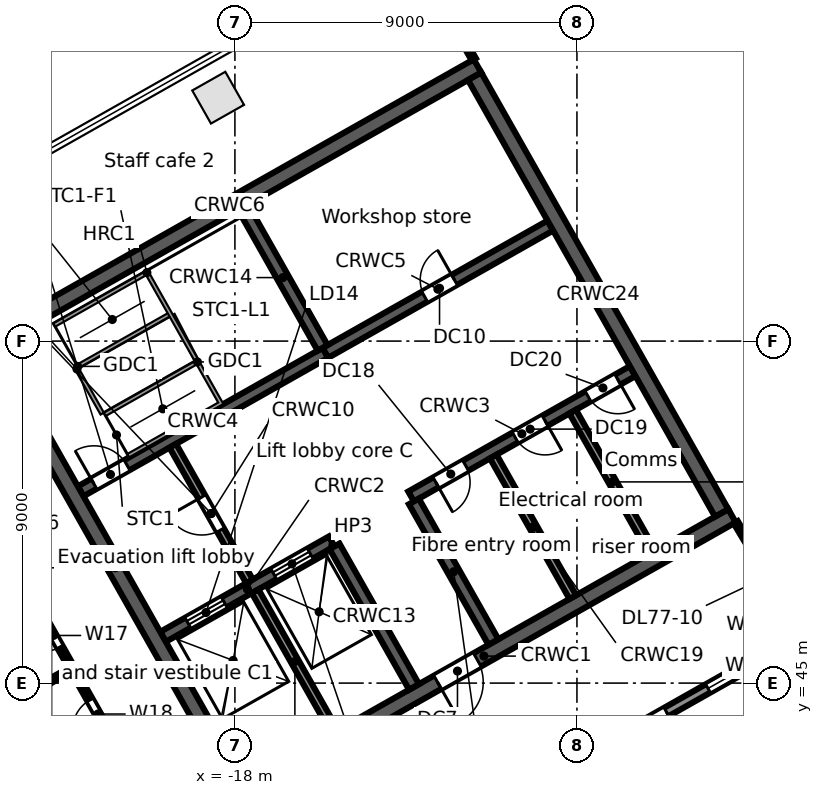
"""IFC4 building model, lengths in metres.
Left out: names, types, materials, properties, quantities, classifications, styles, units other than length and angle.
Written with IfcOpenShell. Run it as: python <this file> out.ifc"""

import sys

from ifc_helpers import new_model, si_unit, direction, frame, frame_2d, origin, origin_2d, place, context, subcontext, project, spatial, rectangle, extrude, element, fill, save


model = new_model("IFC4")
c1 = context("Model", 3, precision=1e-05, world=origin(), true_north=direction((0.0, 1.0)))
c2 = subcontext(c1, "Body", "Model", "MODEL_VIEW")
j1 = project(units=[si_unit("LENGTHUNIT", "METRE"), si_unit("PLANEANGLEUNIT", "RADIAN")], contexts=[c1])
p1 = place(None, origin())
s1 = spatial("IfcSite", under=j1, at=p1, CompositionType="ELEMENT")
p2 = place(p1, origin())
s2 = spatial("IfcBuilding", under=s1, at=p2, CompositionType="ELEMENT")
p3 = place(p2, frame((0.0, 0.0, 339.3)))
s3 = spatial("IfcBuildingStorey", under=s2, at=p3, CompositionType="ELEMENT", Elevation=339.3)
p4 = place(p3, frame((-18.441, 60.406, 0.0), z_axis=(0.0, 0.0, 1.0), x_axis=(-0.87035569594, -0.492423560103, 0.0)))
e1 = element("IfcColumn", 1, at=p4, inside=s3, PredefinedType="COLUMN", context=c2, shape_type="SweptSolid", body=[
    extrude(rectangle(XDim=1.0, YDim=1.0, at=origin_2d()), origin(), (0.0, 0.0, 1.0), 3.8),
])
p5 = place(p3, frame((-3.017, 46.293, 0.0), z_axis=(0.0, 0.0, 1.0), x_axis=(-0.870355474887, -0.492423950812, 0.0)))
e2 = element("IfcWall", 2, at=p5, inside=s3, PredefinedType="STANDARD", context=c2, shape_type="SweptSolid", body=[
    extrude(rectangle(XDim=40.34, YDim=0.25, at=frame_2d((20.17, 0.0))), origin(), (0.0, 0.0, 1.0), 3.52),
])
p6 = place(p5, frame((37.428, 0.0, 0.8)))
e3 = element("IfcOpeningElement", 3, at=p6, cuts=e2, PredefinedType="OPENING", context=c2, shape_type="SweptSolid", body=[
    extrude(rectangle(XDim=2.4, YDim=2.2, at=frame_2d((1.2, 1.1))), frame((0.0, 0.135, 0.0), z_axis=(0.0, -1.0, 0.0), x_axis=(1.0, 0.0, 0.0)), (0.0, 0.0, 1.0), 0.27),
])
p7 = place(p5, frame((34.372, 0.0, 0.0)))
e4 = element("IfcOpeningElement", 4, at=p7, cuts=e2, PredefinedType="OPENING", context=c2, shape_type="SweptSolid", body=[
    extrude(rectangle(XDim=1.8, YDim=2.4, at=frame_2d((0.9, 1.2))), frame((0.0, 0.135, 0.0), z_axis=(0.0, -1.0, 0.0), x_axis=(1.0, 0.0, 0.0)), (0.0, 0.0, 1.0), 0.27),
])
p8 = place(p5, frame((30.716, 0.0, 0.8)))
e5 = element("IfcOpeningElement", 5, at=p8, cuts=e2, PredefinedType="OPENING", context=c2, shape_type="SweptSolid", body=[
    extrude(rectangle(XDim=2.4, YDim=2.2, at=frame_2d((1.2, 1.1))), frame((0.0, 0.135, 0.0), z_axis=(0.0, -1.0, 0.0), x_axis=(1.0, 0.0, 0.0)), (0.0, 0.0, 1.0), 0.27),
])
p9 = place(p5, frame((27.36, 0.0, 0.8)))
e6 = element("IfcOpeningElement", 6, at=p9, cuts=e2, PredefinedType="OPENING", context=c2, shape_type="SweptSolid", body=[
    extrude(rectangle(XDim=2.4, YDim=2.2, at=frame_2d((1.2, 1.1))), frame((0.0, 0.135, 0.0), z_axis=(0.0, -1.0, 0.0), x_axis=(1.0, 0.0, 0.0)), (0.0, 0.0, 1.0), 0.27),
])
p10 = place(p5, frame((24.304, 0.0, 0.0)))
e7 = element("IfcOpeningElement", 7, at=p10, cuts=e2, PredefinedType="OPENING", context=c2, shape_type="SweptSolid", body=[
    extrude(rectangle(XDim=1.8, YDim=2.4, at=frame_2d((0.9, 1.2))), frame((0.0, 0.135, 0.0), z_axis=(0.0, -1.0, 0.0), x_axis=(1.0, 0.0, 0.0)), (0.0, 0.0, 1.0), 0.27),
])
p11 = place(p5, frame((20.648, 0.0, 0.8)))
e8 = element("IfcOpeningElement", 8, at=p11, cuts=e2, PredefinedType="OPENING", context=c2, shape_type="SweptSolid", body=[
    extrude(rectangle(XDim=2.4, YDim=2.2, at=frame_2d((1.2, 1.1))), frame((0.0, 0.135, 0.0), z_axis=(0.0, -1.0, 0.0), x_axis=(1.0, 0.0, 0.0)), (0.0, 0.0, 1.0), 0.27),
])
p12 = place(p5, frame((17.292, 0.0, 0.8)))
e9 = element("IfcOpeningElement", 9, at=p12, cuts=e2, PredefinedType="OPENING", context=c2, shape_type="SweptSolid", body=[
    extrude(rectangle(XDim=2.4, YDim=2.2, at=frame_2d((1.2, 1.1))), frame((0.0, 0.135, 0.0), z_axis=(0.0, -1.0, 0.0), x_axis=(1.0, 0.0, 0.0)), (0.0, 0.0, 1.0), 0.27),
])
p13 = place(p5, frame((14.236, 0.0, 0.0)))
e10 = element("IfcOpeningElement", 10, at=p13, cuts=e2, PredefinedType="OPENING", context=c2, shape_type="SweptSolid", body=[
    extrude(rectangle(XDim=1.8, YDim=2.4, at=frame_2d((0.9, 1.2))), frame((0.0, 0.135, 0.0), z_axis=(0.0, -1.0, 0.0), x_axis=(1.0, 0.0, 0.0)), (0.0, 0.0, 1.0), 0.27),
])
p14 = place(p5, frame((10.58, 0.0, 0.8)))
e11 = element("IfcOpeningElement", 11, at=p14, cuts=e2, PredefinedType="OPENING", context=c2, shape_type="SweptSolid", body=[
    extrude(rectangle(XDim=2.4, YDim=2.2, at=frame_2d((1.2, 1.1))), frame((0.0, 0.135, 0.0), z_axis=(0.0, -1.0, 0.0), x_axis=(1.0, 0.0, 0.0)), (0.0, 0.0, 1.0), 0.27),
])
p15 = place(p5, frame((7.224, 0.0, 0.8)))
e12 = element("IfcOpeningElement", 12, at=p15, cuts=e2, PredefinedType="OPENING", context=c2, shape_type="SweptSolid", body=[
    extrude(rectangle(XDim=2.4, YDim=2.2, at=frame_2d((1.2, 1.1))), frame((0.0, 0.135, 0.0), z_axis=(0.0, -1.0, 0.0), x_axis=(1.0, 0.0, 0.0)), (0.0, 0.0, 1.0), 0.27),
])
p16 = place(p5, frame((4.168, 0.0, 0.0)))
e13 = element("IfcOpeningElement", 13, at=p16, cuts=e2, PredefinedType="OPENING", context=c2, shape_type="SweptSolid", body=[
    extrude(rectangle(XDim=1.8, YDim=2.4, at=frame_2d((0.9, 1.2))), frame((0.0, 0.135, 0.0), z_axis=(0.0, -1.0, 0.0), x_axis=(1.0, 0.0, 0.0)), (0.0, 0.0, 1.0), 0.27),
])
p17 = place(p5, frame((0.512, 0.0, 0.8)))
e14 = element("IfcOpeningElement", 14, at=p17, cuts=e2, PredefinedType="OPENING", context=c2, shape_type="SweptSolid", body=[
    extrude(rectangle(XDim=2.4, YDim=2.2, at=frame_2d((1.2, 1.1))), frame((0.0, 0.135, 0.0), z_axis=(0.0, -1.0, 0.0), x_axis=(1.0, 0.0, 0.0)), (0.0, 0.0, 1.0), 0.27),
])
p18 = place(p3, frame((-17.975, 42.017, 0.0), z_axis=(0.0, 0.0, 1.0), x_axis=(0.87034965173, 0.492434243055, 0.0)))
e15 = element("IfcWall", 15, at=p18, inside=s3, PredefinedType="SOLIDWALL", context=c2, shape_type="SweptSolid", body=[
    extrude(rectangle(XDim=15.0, YDim=0.4, at=frame_2d((7.5, 0.0))), origin(), (0.0, 0.0, 1.0), 3.52),
])
p19 = place(p18, frame((6.1, 0.0, 0.0)))
e16 = element("IfcOpeningElement", 16, at=p19, cuts=e15, PredefinedType="OPENING", context=c2, shape_type="SweptSolid", body=[
    extrude(rectangle(XDim=1.2, YDim=2.1, at=frame_2d((0.6, 1.05))), frame((0.0, 0.21, 0.0), z_axis=(0.0, -1.0, 0.0), x_axis=(1.0, 0.0, 0.0)), (0.0, 0.0, 1.0), 0.42),
])
p20 = place(p3, frame((-19.892, 46.218, 0.0), z_axis=(0.0, 0.0, 1.0), x_axis=(0.870341639186, 0.492448404505, 0.0)))
e17 = element("IfcWall", 17, at=p20, inside=s3, PredefinedType="SOLIDWALL", context=c2, shape_type="SweptSolid", body=[
    extrude(rectangle(XDim=5.1, YDim=0.3, at=frame_2d((2.55, 0.0))), origin(), (0.0, 0.0, 1.0), 3.52),
])
p21 = place(p20, frame((0.75, 0.0, 0.0)))
e18 = element("IfcOpeningElement", 18, at=p21, cuts=e17, PredefinedType="OPENING", context=c2, shape_type="SweptSolid", body=[
    extrude(rectangle(XDim=1.1, YDim=2.1, at=frame_2d((0.55, 1.05))), frame((0.0, 0.16, 0.0), z_axis=(0.0, -1.0, 0.0), x_axis=(1.0, 0.0, 0.0)), (0.0, 0.0, 1.0), 0.32),
])
p22 = place(p20, frame((3.35, 0.0, 0.0)))
e19 = element("IfcOpeningElement", 19, at=p22, cuts=e17, PredefinedType="OPENING", context=c2, shape_type="SweptSolid", body=[
    extrude(rectangle(XDim=1.1, YDim=2.1, at=frame_2d((0.55, 1.05))), frame((0.0, 0.16, 0.0), z_axis=(0.0, -1.0, 0.0), x_axis=(1.0, 0.0, 0.0)), (0.0, 0.0, 1.0), 0.32),
])
p23 = place(p3, frame((-13.365, 49.911, 0.0), z_axis=(0.0, 0.0, 1.0), x_axis=(0.870347618718, 0.492437836272, 0.0)))
e20 = element("IfcWall", 20, at=p23, inside=s3, PredefinedType="SOLIDWALL", context=c2, shape_type="SweptSolid", body=[
    extrude(rectangle(XDim=6.7, YDim=0.3, at=frame_2d((3.35, 0.0))), origin(), (0.0, 0.0, 1.0), 3.52),
])
p24 = place(p23, frame((0.75, 0.0, 0.0)))
e21 = element("IfcOpeningElement", 21, at=p24, cuts=e20, PredefinedType="OPENING", context=c2, shape_type="SweptSolid", body=[
    extrude(rectangle(XDim=0.9, YDim=2.1, at=frame_2d((0.45, 1.05))), frame((0.0, 0.16, 0.0), z_axis=(0.0, -1.0, 0.0), x_axis=(1.0, 0.0, 0.0)), (0.0, 0.0, 1.0), 0.32),
])
p25 = place(p23, frame((3.15, 0.0, 0.0)))
e22 = element("IfcOpeningElement", 22, at=p25, cuts=e20, PredefinedType="OPENING", context=c2, shape_type="SweptSolid", body=[
    extrude(rectangle(XDim=0.9, YDim=2.1, at=frame_2d((0.45, 1.05))), frame((0.0, 0.16, 0.0), z_axis=(0.0, -1.0, 0.0), x_axis=(1.0, 0.0, 0.0)), (0.0, 0.0, 1.0), 0.32),
])
p26 = place(p23, frame((5.35, 0.0, 0.0)))
e23 = element("IfcOpeningElement", 23, at=p26, cuts=e20, PredefinedType="OPENING", context=c2, shape_type="SweptSolid", body=[
    extrude(rectangle(XDim=0.9, YDim=2.1, at=frame_2d((0.45, 1.05))), frame((0.0, 0.16, 0.0), z_axis=(0.0, -1.0, 0.0), x_axis=(1.0, 0.0, 0.0)), (0.0, 0.0, 1.0), 0.32),
])
p27 = place(p3, frame((-22.059, 50.047, 0.0), z_axis=(0.0, 0.0, 1.0), x_axis=(0.87035077051, 0.49243226567, 0.0)))
e24 = element("IfcWall", 24, at=p27, inside=s3, PredefinedType="SOLIDWALL", context=c2, shape_type="SweptSolid", body=[
    extrude(rectangle(XDim=7.4, YDim=0.3, at=frame_2d((3.7, 0.0))), origin(), (0.0, 0.0, 1.0), 3.52),
])
p28 = place(p27, frame((0.4, 0.0, 0.0)))
e25 = element("IfcOpeningElement", 25, at=p28, cuts=e24, PredefinedType="OPENING", context=c2, shape_type="SweptSolid", body=[
    extrude(rectangle(XDim=1.0, YDim=2.1, at=frame_2d((0.5, 1.05))), frame((0.0, 0.16, 0.0), z_axis=(0.0, -1.0, 0.0), x_axis=(1.0, 0.0, 0.0)), (0.0, 0.0, 1.0), 0.32),
])
p29 = place(p3, frame((-15.618, 53.691, 0.0), z_axis=(0.0, 0.0, 1.0), x_axis=(0.870362830851, 0.492410948978, 0.0)))
e26 = element("IfcWall", 26, at=p29, inside=s3, PredefinedType="SOLIDWALL", context=c2, shape_type="SweptSolid", body=[
    extrude(rectangle(XDim=6.8, YDim=0.3, at=frame_2d((3.4, 0.0))), origin(), (0.0, 0.0, 1.0), 3.52),
])
p30 = place(p29, frame((3.0, 0.0, 0.0)))
e27 = element("IfcOpeningElement", 27, at=p30, cuts=e26, PredefinedType="OPENING", context=c2, shape_type="SweptSolid", body=[
    extrude(rectangle(XDim=0.9, YDim=2.1, at=frame_2d((0.45, 1.05))), frame((0.0, 0.16, 0.0), z_axis=(0.0, -1.0, 0.0), x_axis=(1.0, 0.0, 0.0)), (0.0, 0.0, 1.0), 0.32),
])
p31 = place(p3, frame((-24.672, 53.854, 0.0), z_axis=(0.0, 0.0, 1.0), x_axis=(0.870353598469, 0.492427267353, 0.0)))
e28 = element("IfcWall", 28, at=p31, inside=s3, PredefinedType="SOLIDWALL", context=c2, shape_type="SweptSolid", body=[
    extrude(rectangle(XDim=15.0, YDim=0.4, at=frame_2d((7.5, 0.0))), origin(), (0.0, 0.0, 1.0), 3.52),
])
p32 = place(p3, frame((-24.4, 53.779, 0.0), z_axis=(0.0, 0.0, 1.0), x_axis=(0.492421663121, -0.870356769198, 0.0)))
e29 = element("IfcWall", 29, at=p32, inside=s3, PredefinedType="SOLIDWALL", context=c2, shape_type="SweptSolid", body=[
    extrude(rectangle(XDim=13.2, YDim=0.4, at=frame_2d((6.6, 0.0))), origin(), (0.0, 0.0, 1.0), 3.52),
])
p33 = place(p3, frame((-17.469, 47.417, 0.0), z_axis=(0.0, 0.0, 1.0), x_axis=(0.492466057713, -0.870331650579, 0.0)))
e30 = element("IfcWall", 30, at=p33, inside=s3, PredefinedType="SOLIDWALL", context=c2, shape_type="SweptSolid", body=[
    extrude(rectangle(XDim=4.25, YDim=0.2, at=frame_2d((2.125, 0.0))), origin(), (0.0, 0.0, 1.0), 3.52),
])
p34 = place(p3, frame((-19.635, 51.246, 0.0), z_axis=(0.0, 0.0, 1.0), x_axis=(0.492408451753, -0.87036424366, 0.0)))
e31 = element("IfcWall", 31, at=p34, inside=s3, PredefinedType="PARTITIONING", context=c2, shape_type="SweptSolid", body=[
    extrude(rectangle(XDim=4.1, YDim=0.2, at=frame_2d((2.05, 0.0))), origin(), (0.0, 0.0, 1.0), 3.52),
])
p35 = place(p34, frame((1.55, 0.0, 0.0)))
e32 = element("IfcOpeningElement", 32, at=p35, cuts=e31, PredefinedType="OPENING", context=c2, shape_type="SweptSolid", body=[
    extrude(rectangle(XDim=1.0, YDim=2.1, at=frame_2d((0.5, 1.05))), frame((0.0, 0.11, 0.0), z_axis=(0.0, -1.0, 0.0), x_axis=(1.0, 0.0, 0.0)), (0.0, 0.0, 1.0), 0.22),
])
for number, where, z_axis, x_axis in (
    (33, (-15.379, 48.599, 0.0), (0.0, 0.0, 1.0), (0.492, -0.87, 0.0)),
    (34, (-17.785, 57.521, 0.0), (0.0, 0.0, 1.0), (0.492, -0.87, 0.0)),
):
    element("IfcWall", number, at=place(p3, frame(where, z_axis=z_axis, x_axis=x_axis)), inside=s3, PredefinedType="SOLIDWALL", context=c2, shape_type="SweptSolid", body=[
        extrude(rectangle(XDim=4.25, YDim=0.3, at=frame_2d((2.125, 0.0))), origin(), (0.0, 0.0, 1.0), 3.52),
    ])
p36 = place(p3, frame((-13.291, 49.781, 0.0), z_axis=(0.0, 0.0, 1.0), x_axis=(0.492397924348, -0.870370199454, 0.0)))
e35 = element("IfcWall", 35, at=p36, inside=s3, PredefinedType="SOLIDWALL", context=c2, shape_type="SweptSolid", body=[
    extrude(rectangle(XDim=4.25, YDim=0.3, at=frame_2d((2.125, 0.0))), origin(), (0.0, 0.0, 1.0), 3.52),
])
p37 = place(p3, frame((-11.202, 50.962, 0.0), z_axis=(0.0, 0.0, 1.0), x_axis=(0.492441437811, -0.870345580977, 0.0)))
e36 = element("IfcWall", 36, at=p37, inside=s3, PredefinedType="PARTITIONING", context=c2, shape_type="SweptSolid", body=[
    extrude(rectangle(XDim=4.25, YDim=0.2, at=frame_2d((2.125, 0.0))), origin(), (0.0, 0.0, 1.0), 3.52),
])
p38 = place(p3, frame((-9.113, 52.144, 0.0), z_axis=(0.0, 0.0, 1.0), x_axis=(0.492422543467, -0.870356271124, 0.0)))
e37 = element("IfcWall", 37, at=p38, inside=s3, PredefinedType="PARTITIONING", context=c2, shape_type="SweptSolid", body=[
    extrude(rectangle(XDim=4.25, YDim=0.2, at=frame_2d((2.125, 0.0))), origin(), (0.0, 0.0, 1.0), 3.52),
])
p39 = place(p3, frame((-11.692, 60.968, 0.0), z_axis=(0.0, 0.0, 1.0), x_axis=(0.492421663121, -0.870356769198, 0.0)))
e38 = element("IfcWall", 38, at=p39, inside=s3, PredefinedType="SOLIDWALL", context=c2, shape_type="SweptSolid", body=[
    extrude(rectangle(XDim=13.2, YDim=0.4, at=frame_2d((6.6, 0.0))), origin(), (0.0, 0.0, 1.0), 3.52),
])
p40 = place(p3, frame((-27.504, 42.428, 0.0), z_axis=(0.0, 0.0, 1.0), x_axis=(0.870308850352, 0.492506350211, 0.0)))
e39 = element("IfcWall", 39, at=p40, inside=s3, PredefinedType="PARTITIONING", context=c2, shape_type="SweptSolid", body=[
    extrude(rectangle(XDim=6.0, YDim=0.125, at=frame_2d((3.0, 0.0))), origin(), (0.0, 0.0, 1.0), 2.792),
])
p41 = place(p3, frame((-23.267, 47.124, 0.0), z_axis=(0.0, 0.0, 1.0), x_axis=(0.492467412326, -0.870330884088, 0.0)))
e40 = element("IfcWall", 40, at=p41, inside=s3, PredefinedType="PARTITIONING", context=c2, shape_type="SweptSolid", body=[
    extrude(rectangle(XDim=2.0, YDim=0.15, at=frame_2d((1.0, 0.0))), origin(), (0.0, 0.0, 1.0), 2.792),
])
p42 = place(p41, frame((0.45, 0.0, 0.0)))
e41 = element("IfcOpeningElement", 41, at=p42, cuts=e40, PredefinedType="OPENING", context=c2, shape_type="SweptSolid", body=[
    extrude(rectangle(XDim=0.9, YDim=2.1, at=frame_2d((0.45, 1.05))), frame((0.0, 0.085, 0.0), z_axis=(0.0, -1.0, 0.0), x_axis=(1.0, 0.0, 0.0)), (0.0, 0.0, 1.0), 0.17),
])
p43 = place(p3, frame((-22.282, 45.383, 0.0), z_axis=(0.0, 0.0, 1.0), x_axis=(0.492560173591, -0.870278389592, 0.0)))
e42 = element("IfcWall", 42, at=p43, inside=s3, PredefinedType="PARTITIONING", context=c2, shape_type="SweptSolid", body=[
    extrude(rectangle(XDim=2.751, YDim=0.15, at=frame_2d((1.375, 0.0))), origin(), (0.0, 0.0, 1.0), 3.52),
])
p44 = place(p43, frame((0.95, 0.0, 0.0)))
e43 = element("IfcOpeningElement", 43, at=p44, cuts=e42, PredefinedType="OPENING", context=c2, shape_type="SweptSolid", body=[
    extrude(rectangle(XDim=0.9, YDim=2.1, at=frame_2d((0.45, 1.05))), frame((0.0, 0.085, 0.0), z_axis=(0.0, -1.0, 0.0), x_axis=(1.0, 0.0, 0.0)), (0.0, 0.0, 1.0), 0.17),
])
p45 = place(p3, frame((-13.382, 64.36, 0.0), z_axis=(0.0, 0.0, 1.0), x_axis=(0.492468354667, -0.870330350874, 0.0)))
e44 = element("IfcWall", 44, at=p45, inside=s3, PredefinedType="PARTITIONING", context=c2, shape_type="SweptSolid", body=[
    extrude(rectangle(XDim=3.385, YDim=0.125, at=frame_2d((1.692, 0.0))), origin(), (0.0, 0.0, 1.0), 2.888),
])
p46 = place(p3, frame((-4.821, 49.23, 0.0), z_axis=(0.0, 0.0, 1.0), x_axis=(0.515006587647, -0.857186219371, 0.0)))
e45 = element("IfcWall", 45, at=p46, inside=s3, PredefinedType="PARTITIONING", context=c2, shape_type="SweptSolid", body=[
    extrude(rectangle(XDim=3.303, YDim=0.125, at=frame_2d((1.651, 0.0))), origin(), (0.0, 0.0, 1.0), 2.8),
])
p47 = place(p46, frame((1.2, 0.0, 0.0)))
e46 = element("IfcOpeningElement", 46, at=p47, cuts=e45, PredefinedType="OPENING", context=c2, shape_type="SweptSolid", body=[
    extrude(rectangle(XDim=0.9, YDim=2.1, at=frame_2d((0.45, 1.05))), frame((0.0, 0.073, 0.0), z_axis=(0.0, -1.0, 0.0), x_axis=(1.0, 0.0, 0.0)), (0.0, 0.0, 1.0), 0.145),
])
p48 = place(p16, origin())
e47 = element("IfcDoor", 47, at=p48, inside=s3, OperationType="DOUBLE_DOOR_SINGLE_SWING", PredefinedType="DOOR", context=c2, shape_type="SweptSolid", body=[
    extrude(rectangle(XDim=1.8, YDim=2.4, at=frame_2d((0.9, 1.2))), frame((0.0, 0.025, 0.0), z_axis=(0.0, -1.0, 0.0), x_axis=(1.0, 0.0, 0.0)), (0.0, 0.0, 1.0), 0.05),
])
fill(e13, e47)
p49 = place(p17, origin())
e48 = element("IfcWindow", 48, at=p49, inside=s3, PartitioningType="SINGLE_PANEL", PredefinedType="WINDOW", context=c2, shape_type="SweptSolid", body=[
    extrude(rectangle(XDim=2.4, YDim=2.2, at=frame_2d((1.2, 1.1))), frame((0.0, 0.03, 0.0), z_axis=(0.0, -1.0, 0.0), x_axis=(1.0, 0.0, 0.0)), (0.0, 0.0, 1.0), 0.06),
])
fill(e14, e48)
p50 = place(p21, origin())
e49 = element("IfcDoor", 49, at=p50, inside=s3, OperationType="DOUBLE_DOOR_SLIDING", PredefinedType="DOOR", context=c2, shape_type="SweptSolid", body=[
    extrude(rectangle(XDim=1.1, YDim=2.1, at=frame_2d((0.55, 1.05))), frame((0.0, 0.025, 0.0), z_axis=(0.0, -1.0, 0.0), x_axis=(1.0, 0.0, 0.0)), (0.0, 0.0, 1.0), 0.05),
])
fill(e18, e49)
p51 = place(p22, origin())
e50 = element("IfcDoor", 50, at=p51, inside=s3, OperationType="DOUBLE_DOOR_SLIDING", PredefinedType="DOOR", context=c2, shape_type="SweptSolid", body=[
    extrude(rectangle(XDim=1.1, YDim=2.1, at=frame_2d((0.55, 1.05))), frame((0.0, 0.025, 0.0), z_axis=(0.0, -1.0, 0.0), x_axis=(1.0, 0.0, 0.0)), (0.0, 0.0, 1.0), 0.05),
])
fill(e19, e50)
p52 = place(p28, origin())
e51 = element("IfcDoor", 51, at=p52, inside=s3, OperationType="SINGLE_SWING_LEFT", PredefinedType="DOOR", context=c2, shape_type="SweptSolid", body=[
    extrude(rectangle(XDim=1.0, YDim=2.1, at=frame_2d((0.5, 1.05))), frame((0.0, 0.025, 0.0), z_axis=(0.0, -1.0, 0.0), x_axis=(1.0, 0.0, 0.0)), (0.0, 0.0, 1.0), 0.05),
])
fill(e25, e51)
p53 = place(p35, frame((1.0, 0.0, 0.0), z_axis=(0.0, 0.0, 1.0), x_axis=(-1.0, 0.0, 0.0)))
e52 = element("IfcDoor", 52, at=p53, inside=s3, OperationType="SINGLE_SWING_RIGHT", PredefinedType="DOOR", context=c2, shape_type="SweptSolid", body=[
    extrude(rectangle(XDim=1.0, YDim=2.1, at=frame_2d((0.5, 1.05))), frame((0.0, 0.025, 0.0), z_axis=(0.0, -1.0, 0.0), x_axis=(1.0, 0.0, 0.0)), (0.0, 0.0, 1.0), 0.05),
])
fill(e32, e52)
p54 = place(p19, frame((1.2, 0.0, 0.0), z_axis=(0.0, 0.0, 1.0), x_axis=(-1.0, 0.0, 0.0)))
e53 = element("IfcDoor", 53, at=p54, inside=s3, OperationType="SINGLE_SWING_RIGHT", PredefinedType="DOOR", context=c2, shape_type="SweptSolid", body=[
    extrude(rectangle(XDim=1.2, YDim=2.1, at=frame_2d((0.6, 1.05))), frame((0.0, 0.025, 0.0), z_axis=(0.0, -1.0, 0.0), x_axis=(1.0, 0.0, 0.0)), (0.0, 0.0, 1.0), 0.05),
])
fill(e16, e53)
p55 = place(p30, origin())
e54 = element("IfcDoor", 54, at=p55, inside=s3, OperationType="SINGLE_SWING_RIGHT", PredefinedType="DOOR", context=c2, shape_type="SweptSolid", body=[
    extrude(rectangle(XDim=0.9, YDim=2.1, at=frame_2d((0.45, 1.05))), frame((0.0, 0.025, 0.0), z_axis=(0.0, -1.0, 0.0), x_axis=(1.0, 0.0, 0.0)), (0.0, 0.0, 1.0), 0.05),
])
fill(e27, e54)
p56 = place(p24, frame((0.9, 0.0, 0.0), z_axis=(0.0, 0.0, 1.0), x_axis=(-1.0, 0.0, 0.0)))
e55 = element("IfcDoor", 55, at=p56, inside=s3, OperationType="SINGLE_SWING_RIGHT", PredefinedType="DOOR", context=c2, shape_type="SweptSolid", body=[
    extrude(rectangle(XDim=0.9, YDim=2.1, at=frame_2d((0.45, 1.05))), frame((0.0, 0.025, 0.0), z_axis=(0.0, -1.0, 0.0), x_axis=(1.0, 0.0, 0.0)), (0.0, 0.0, 1.0), 0.05),
])
fill(e21, e55)
p57 = place(p25, frame((0.9, 0.0, 0.0), z_axis=(0.0, 0.0, 1.0), x_axis=(-1.0, 0.0, 0.0)))
e56 = element("IfcDoor", 56, at=p57, inside=s3, OperationType="SINGLE_SWING_LEFT", PredefinedType="DOOR", context=c2, shape_type="SweptSolid", body=[
    extrude(rectangle(XDim=0.9, YDim=2.1, at=frame_2d((0.45, 1.05))), frame((0.0, 0.025, 0.0), z_axis=(0.0, -1.0, 0.0), x_axis=(1.0, 0.0, 0.0)), (0.0, 0.0, 1.0), 0.05),
])
fill(e22, e56)
p58 = place(p26, frame((0.9, 0.0, 0.0), z_axis=(0.0, 0.0, 1.0), x_axis=(-1.0, 0.0, 0.0)))
e57 = element("IfcDoor", 57, at=p58, inside=s3, OperationType="SINGLE_SWING_LEFT", PredefinedType="DOOR", context=c2, shape_type="SweptSolid", body=[
    extrude(rectangle(XDim=0.9, YDim=2.1, at=frame_2d((0.45, 1.05))), frame((0.0, 0.025, 0.0), z_axis=(0.0, -1.0, 0.0), x_axis=(1.0, 0.0, 0.0)), (0.0, 0.0, 1.0), 0.05),
])
fill(e23, e57)
p59 = place(p44, frame((0.9, 0.0, 0.0), z_axis=(0.0, 0.0, 1.0), x_axis=(-1.0, 0.0, 0.0)))
e58 = element("IfcDoor", 58, at=p59, inside=s3, OperationType="SINGLE_SWING_LEFT", PredefinedType="DOOR", context=c2, shape_type="SweptSolid", body=[
    extrude(rectangle(XDim=0.9, YDim=2.1, at=frame_2d((0.45, 1.05))), frame((0.0, 0.025, 0.0), z_axis=(0.0, -1.0, 0.0), x_axis=(1.0, 0.0, 0.0)), (0.0, 0.0, 1.0), 0.05),
])
fill(e43, e58)
p60 = place(p42, frame((0.9, 0.0, 0.0), z_axis=(0.0, 0.0, 1.0), x_axis=(-1.0, 0.0, 0.0)))
e59 = element("IfcDoor", 59, at=p60, inside=s3, OperationType="SINGLE_SWING_RIGHT", PredefinedType="DOOR", context=c2, shape_type="SweptSolid", body=[
    extrude(rectangle(XDim=0.9, YDim=2.1, at=frame_2d((0.45, 1.05))), frame((0.0, 0.025, 0.0), z_axis=(0.0, -1.0, 0.0), x_axis=(1.0, 0.0, 0.0)), (0.0, 0.0, 1.0), 0.05),
])
fill(e41, e59)
save(model, sys.argv[1])
